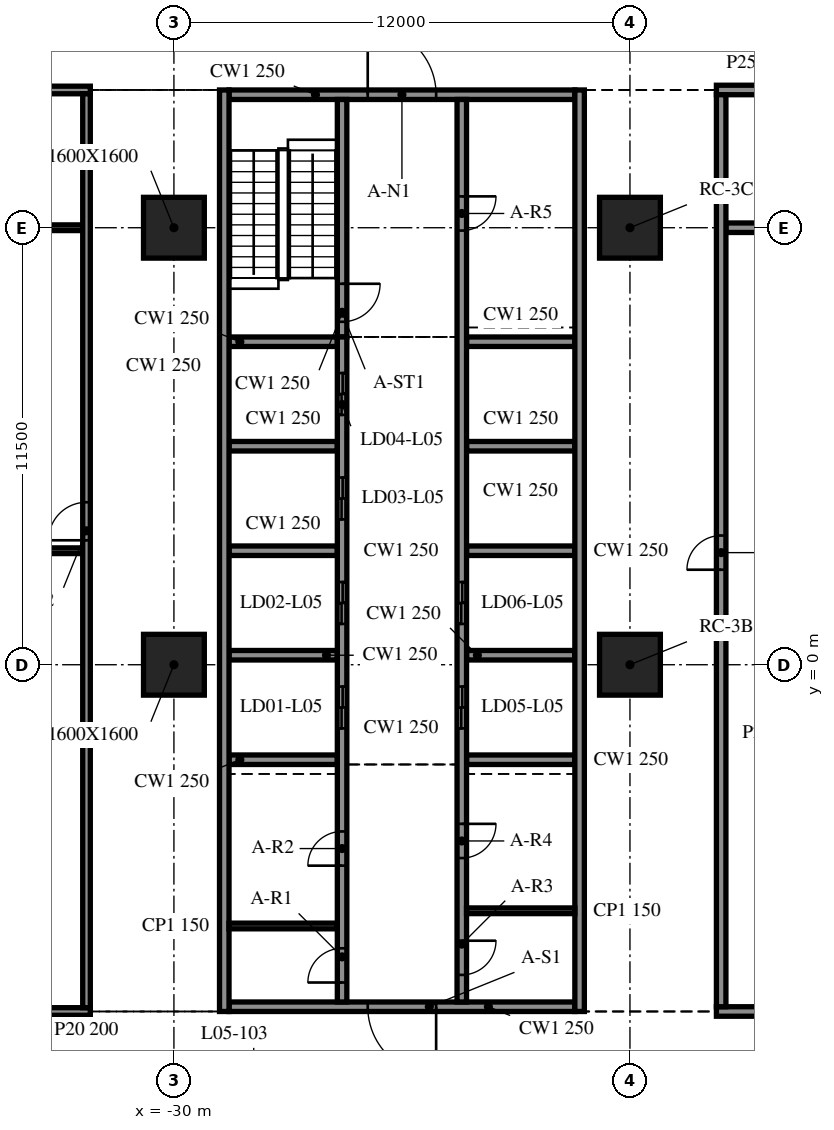
"""IFC4 building model, lengths in metres.
Left out: names, types, materials, properties, quantities, classifications, styles, units other than length and angle.
Written with IfcOpenShell. Run it as: python <this file> out.ifc"""

import sys

from ifc_helpers import new_model, si_unit, direction, frame, frame_2d, origin, origin_2d, place, context, subcontext, project, spatial, rectangle, extrude, element, fill, save


model = new_model("IFC4")
c1 = context("Model", 3, precision=1e-05, world=origin(), true_north=direction((0.0, 1.0)))
c2 = subcontext(c1, "Body", "Model", "MODEL_VIEW")
j1 = project(units=[si_unit("LENGTHUNIT", "METRE"), si_unit("PLANEANGLEUNIT", "RADIAN")], contexts=[c1])
p1 = place(None, origin())
s1 = spatial("IfcSite", under=j1, at=p1, CompositionType="ELEMENT")
p2 = place(p1, origin())
s2 = spatial("IfcBuilding", under=s1, at=p2, CompositionType="ELEMENT")
p3 = place(p2, frame((0.0, 0.0, 24.4)))
s3 = spatial("IfcBuildingStorey", under=s2, at=p3, CompositionType="ELEMENT", Elevation=24.4)
for number, where, z_axis, x_axis in (
    (1, (-30.0, 0.0, -0.34), (0.0, 0.0, 1.0), (1.0, 0.0, 0.0)),
    (2, (-30.0, 11.5, -0.34), (0.0, 0.0, 1.0), (1.0, 0.0, 0.0)),
    (3, (-18.0, 0.0, -0.34), (0.0, 0.0, 1.0), (1.0, 0.0, 0.0)),
    (4, (-18.0, 11.5, -0.34), (0.0, 0.0, 1.0), (1.0, 0.0, 0.0)),
):
    element("IfcColumn", number, at=place(p3, frame(where, z_axis=z_axis, x_axis=x_axis)), inside=s3, PredefinedType="COLUMN", context=c2, shape_type="SweptSolid", body=[
        extrude(rectangle(XDim=1.6, YDim=1.6, at=origin_2d()), origin(), (0.0, 0.0, 1.0), 4.3),
    ])
for number, where, z_axis, x_axis in (
    (5, (-28.675, 15.125, 0.0), (0.0, 0.0, 1.0), (0.0, -1.0, 0.0)),
    (6, (-19.325, -9.125, 0.0), (0.0, 0.0, 1.0), (0.0, 1.0, 0.0)),
):
    element("IfcWall", number, at=place(p3, frame(where, z_axis=z_axis, x_axis=x_axis)), inside=s3, PredefinedType="SOLIDWALL", context=c2, shape_type="SweptSolid", body=[
        extrude(rectangle(XDim=24.25, YDim=0.25, at=frame_2d((12.125, 0.0))), origin(), (0.0, 0.0, 1.0), 3.96),
    ])
p4 = place(p3, frame((-19.45, -9.0, 0.0), z_axis=(0.0, 0.0, 1.0), x_axis=(-1.0, 0.0, 0.0)))
e7 = element("IfcWall", 7, at=p4, inside=s3, PredefinedType="SOLIDWALL", context=c2, shape_type="SweptSolid", body=[
    extrude(rectangle(XDim=9.1, YDim=0.25, at=frame_2d((4.55, 0.0))), origin(), (0.0, 0.0, 1.0), 3.96),
])
p5 = place(p4, frame((3.65, 0.0, 0.0)))
e8 = element("IfcOpeningElement", 8, at=p5, cuts=e7, PredefinedType="OPENING", context=c2, shape_type="SweptSolid", body=[
    extrude(rectangle(XDim=1.8, YDim=2.1, at=frame_2d((0.9, 1.05))), frame((0.0, 0.135, 0.0), z_axis=(0.0, -1.0, 0.0), x_axis=(1.0, 0.0, 0.0)), (0.0, 0.0, 1.0), 0.27),
])
p6 = place(p3, frame((-28.55, 15.0, 0.0), z_axis=(0.0, 0.0, 1.0), x_axis=(1.0, 0.0, 0.0)))
e9 = element("IfcWall", 9, at=p6, inside=s3, PredefinedType="SOLIDWALL", context=c2, shape_type="SweptSolid", body=[
    extrude(rectangle(XDim=9.1, YDim=0.25, at=frame_2d((4.55, 0.0))), origin(), (0.0, 0.0, 1.0), 3.96),
])
p7 = place(p6, frame((3.65, 0.0, 0.0)))
e10 = element("IfcOpeningElement", 10, at=p7, cuts=e9, PredefinedType="OPENING", context=c2, shape_type="SweptSolid", body=[
    extrude(rectangle(XDim=1.8, YDim=2.1, at=frame_2d((0.9, 1.05))), frame((0.0, 0.135, 0.0), z_axis=(0.0, -1.0, 0.0), x_axis=(1.0, 0.0, 0.0)), (0.0, 0.0, 1.0), 0.27),
])
p8 = place(p3, frame((-25.575, -8.875, 0.0), z_axis=(0.0, 0.0, 1.0), x_axis=(0.0, 1.0, 0.0)))
e11 = element("IfcWall", 11, at=p8, inside=s3, PredefinedType="SOLIDWALL", context=c2, shape_type="SweptSolid", body=[
    extrude(rectangle(XDim=17.5, YDim=0.25, at=frame_2d((8.75, 0.0))), origin(), (0.0, 0.0, 1.0), 3.96),
])
p9 = place(p8, frame((7.2, 0.0, 0.0)))
e12 = element("IfcOpeningElement", 12, at=p9, cuts=e11, PredefinedType="OPENING", context=c2, shape_type="SweptSolid", body=[
    extrude(rectangle(XDim=1.1, YDim=2.1, at=frame_2d((0.55, 1.05))), frame((0.0, 0.135, 0.0), z_axis=(0.0, -1.0, 0.0), x_axis=(1.0, 0.0, 0.0)), (0.0, 0.0, 1.0), 0.27),
])
p10 = place(p8, frame((9.95, 0.0, 0.0)))
e13 = element("IfcOpeningElement", 13, at=p10, cuts=e11, PredefinedType="OPENING", context=c2, shape_type="SweptSolid", body=[
    extrude(rectangle(XDim=1.1, YDim=2.1, at=frame_2d((0.55, 1.05))), frame((0.0, 0.135, 0.0), z_axis=(0.0, -1.0, 0.0), x_axis=(1.0, 0.0, 0.0)), (0.0, 0.0, 1.0), 0.27),
])
p11 = place(p8, frame((12.7, 0.0, 0.0)))
e14 = element("IfcOpeningElement", 14, at=p11, cuts=e11, PredefinedType="OPENING", context=c2, shape_type="SweptSolid", body=[
    extrude(rectangle(XDim=1.1, YDim=2.1, at=frame_2d((0.55, 1.05))), frame((0.0, 0.135, 0.0), z_axis=(0.0, -1.0, 0.0), x_axis=(1.0, 0.0, 0.0)), (0.0, 0.0, 1.0), 0.27),
])
p12 = place(p8, frame((15.45, 0.0, 0.0)))
e15 = element("IfcOpeningElement", 15, at=p12, cuts=e11, PredefinedType="OPENING", context=c2, shape_type="SweptSolid", body=[
    extrude(rectangle(XDim=1.1, YDim=2.1, at=frame_2d((0.55, 1.05))), frame((0.0, 0.135, 0.0), z_axis=(0.0, -1.0, 0.0), x_axis=(1.0, 0.0, 0.0)), (0.0, 0.0, 1.0), 0.27),
])
p13 = place(p8, frame((0.512, 0.0, 0.0)))
e16 = element("IfcOpeningElement", 16, at=p13, cuts=e11, PredefinedType="OPENING", context=c2, shape_type="SweptSolid", body=[
    extrude(rectangle(XDim=0.9, YDim=2.1, at=frame_2d((0.45, 1.05))), frame((0.0, 0.135, 0.0), z_axis=(0.0, -1.0, 0.0), x_axis=(1.0, 0.0, 0.0)), (0.0, 0.0, 1.0), 0.27),
])
p14 = place(p8, frame((3.587, 0.0, 0.0)))
e17 = element("IfcOpeningElement", 17, at=p14, cuts=e11, PredefinedType="OPENING", context=c2, shape_type="SweptSolid", body=[
    extrude(rectangle(XDim=0.9, YDim=2.1, at=frame_2d((0.45, 1.05))), frame((0.0, 0.135, 0.0), z_axis=(0.0, -1.0, 0.0), x_axis=(1.0, 0.0, 0.0)), (0.0, 0.0, 1.0), 0.27),
])
p15 = place(p3, frame((-25.575, 14.875, 0.0), z_axis=(0.0, 0.0, 1.0), x_axis=(0.0, -1.0, 0.0)))
e18 = element("IfcWall", 18, at=p15, inside=s3, PredefinedType="SOLIDWALL", context=c2, shape_type="SweptSolid", body=[
    extrude(rectangle(XDim=6.25, YDim=0.25, at=frame_2d((3.125, 0.0))), origin(), (0.0, 0.0, 1.0), 3.96),
])
p16 = place(p15, frame((4.85, 0.0, 0.0)))
e19 = element("IfcOpeningElement", 19, at=p16, cuts=e18, PredefinedType="OPENING", context=c2, shape_type="SweptSolid", body=[
    extrude(rectangle(XDim=1.0, YDim=2.1, at=frame_2d((0.5, 1.05))), frame((0.0, 0.135, 0.0), z_axis=(0.0, -1.0, 0.0), x_axis=(1.0, 0.0, 0.0)), (0.0, 0.0, 1.0), 0.27),
])
p17 = place(p3, frame((-22.425, 14.875, 0.0), z_axis=(0.0, 0.0, 1.0), x_axis=(0.0, -1.0, 0.0)))
e20 = element("IfcWall", 20, at=p17, inside=s3, PredefinedType="SOLIDWALL", context=c2, shape_type="SweptSolid", body=[
    extrude(rectangle(XDim=23.75, YDim=0.25, at=frame_2d((11.875, 0.0))), origin(), (0.0, 0.0, 1.0), 3.96),
])
p18 = place(p17, frame((15.45, 0.0, 0.0)))
e21 = element("IfcOpeningElement", 21, at=p18, cuts=e20, PredefinedType="OPENING", context=c2, shape_type="SweptSolid", body=[
    extrude(rectangle(XDim=1.1, YDim=2.1, at=frame_2d((0.55, 1.05))), frame((0.0, 0.135, 0.0), z_axis=(0.0, -1.0, 0.0), x_axis=(1.0, 0.0, 0.0)), (0.0, 0.0, 1.0), 0.27),
])
p19 = place(p17, frame((12.7, 0.0, 0.0)))
e22 = element("IfcOpeningElement", 22, at=p19, cuts=e20, PredefinedType="OPENING", context=c2, shape_type="SweptSolid", body=[
    extrude(rectangle(XDim=1.1, YDim=2.1, at=frame_2d((0.55, 1.05))), frame((0.0, 0.135, 0.0), z_axis=(0.0, -1.0, 0.0), x_axis=(1.0, 0.0, 0.0)), (0.0, 0.0, 1.0), 0.27),
])
p20 = place(p17, frame((22.137, 0.0, 0.0)))
e23 = element("IfcOpeningElement", 23, at=p20, cuts=e20, PredefinedType="OPENING", context=c2, shape_type="SweptSolid", body=[
    extrude(rectangle(XDim=0.9, YDim=2.1, at=frame_2d((0.45, 1.05))), frame((0.0, 0.135, 0.0), z_axis=(0.0, -1.0, 0.0), x_axis=(1.0, 0.0, 0.0)), (0.0, 0.0, 1.0), 0.27),
])
p21 = place(p17, frame((19.062, 0.0, 0.0)))
e24 = element("IfcOpeningElement", 24, at=p21, cuts=e20, PredefinedType="OPENING", context=c2, shape_type="SweptSolid", body=[
    extrude(rectangle(XDim=0.9, YDim=2.1, at=frame_2d((0.45, 1.05))), frame((0.0, 0.135, 0.0), z_axis=(0.0, -1.0, 0.0), x_axis=(1.0, 0.0, 0.0)), (0.0, 0.0, 1.0), 0.27),
])
p22 = place(p17, frame((2.55, 0.0, 0.0)))
e25 = element("IfcOpeningElement", 25, at=p22, cuts=e20, PredefinedType="OPENING", context=c2, shape_type="SweptSolid", body=[
    extrude(rectangle(XDim=0.9, YDim=2.1, at=frame_2d((0.45, 1.05))), frame((0.0, 0.135, 0.0), z_axis=(0.0, -1.0, 0.0), x_axis=(1.0, 0.0, 0.0)), (0.0, 0.0, 1.0), 0.27),
])
for number, where, z_axis, x_axis in (
    (26, (-28.55, -2.5, 0.0), (0.0, 0.0, 1.0), (1.0, 0.0, 0.0)),
    (27, (-28.55, 0.25, 0.0), (0.0, 0.0, 1.0), (1.0, 0.0, 0.0)),
    (28, (-28.55, 3.0, 0.0), (0.0, 0.0, 1.0), (1.0, 0.0, 0.0)),
    (29, (-28.55, 5.75, 0.0), (0.0, 0.0, 1.0), (1.0, 0.0, 0.0)),
    (30, (-28.55, 8.5, 0.0), (0.0, 0.0, 1.0), (1.0, 0.0, 0.0)),
    (31, (-22.3, -2.5, 0.0), (0.0, 0.0, 1.0), (1.0, 0.0, 0.0)),
    (32, (-22.3, 0.25, 0.0), (0.0, 0.0, 1.0), (1.0, 0.0, 0.0)),
    (33, (-22.3, 3.0, 0.0), (0.0, 0.0, 1.0), (1.0, 0.0, 0.0)),
    (34, (-22.3, 5.75, 0.0), (0.0, 0.0, 1.0), (1.0, 0.0, 0.0)),
    (35, (-22.3, 8.5, 0.0), (0.0, 0.0, 1.0), (1.0, 0.0, 0.0)),
):
    element("IfcWall", number, at=place(p3, frame(where, z_axis=z_axis, x_axis=x_axis)), inside=s3, PredefinedType="SOLIDWALL", context=c2, shape_type="SweptSolid", body=[
        extrude(rectangle(XDim=2.85, YDim=0.25, at=frame_2d((1.425, 0.0))), origin(), (0.0, 0.0, 1.0), 3.96),
    ])
for number, where, z_axis, x_axis in (
    (36, (-28.55, -6.875, 0.0), (0.0, 0.0, 1.0), (1.0, 0.0, 0.0)),
    (37, (-22.3, -6.475, 0.0), (0.0, 0.0, 1.0), (1.0, 0.0, 0.0)),
):
    element("IfcWall", number, at=place(p3, frame(where, z_axis=z_axis, x_axis=x_axis)), inside=s3, PredefinedType="PARTITIONING", context=c2, shape_type="SweptSolid", body=[
        extrude(rectangle(XDim=2.85, YDim=0.15, at=frame_2d((1.425, 0.0))), origin(), (0.0, 0.0, 1.0), 3.96),
    ])
p23 = place(p3, frame((-45.55, -9.125, 0.0), z_axis=(0.0, 0.0, 1.0), x_axis=(1.0, 0.0, 0.0)))
e38 = element("IfcWall", 38, at=p23, inside=s3, PredefinedType="PARTITIONING", context=c2, shape_type="SweptSolid", body=[
    extrude(rectangle(XDim=13.35, YDim=0.2, at=frame_2d((6.675, 0.0))), origin(), (0.0, 0.0, 1.0), 3.96),
])
p24 = place(p23, frame((6.9, 0.0, 0.0)))
e39 = element("IfcOpeningElement", 39, at=p24, cuts=e38, PredefinedType="OPENING", context=c2, shape_type="SweptSolid", body=[
    extrude(rectangle(XDim=1.2, YDim=2.1, at=frame_2d((0.6, 1.05))), frame((0.0, 0.11, 0.0), z_axis=(0.0, -1.0, 0.0), x_axis=(1.0, 0.0, 0.0)), (0.0, 0.0, 1.0), 0.22),
])
p25 = place(p3, frame((-15.725, -9.125, 0.0), z_axis=(0.0, 0.0, 1.0), x_axis=(1.0, 0.0, 0.0)))
e40 = element("IfcWall", 40, at=p25, inside=s3, PredefinedType="PARTITIONING", context=c2, shape_type="SweptSolid", body=[
    extrude(rectangle(XDim=7.35, YDim=0.25, at=frame_2d((3.675, 0.0))), origin(), (0.0, 0.0, 1.0), 3.96),
])
p26 = place(p3, frame((-45.35, 3.0, 0.0), z_axis=(0.0, 0.0, 1.0), x_axis=(1.0, 0.0, 0.0)))
e41 = element("IfcWall", 41, at=p26, inside=s3, PredefinedType="PARTITIONING", context=c2, shape_type="SweptSolid", body=[
    extrude(rectangle(XDim=12.95, YDim=0.15, at=frame_2d((6.475, 0.0))), origin(), (0.0, 0.0, 1.0), 3.96),
])
p27 = place(p3, frame((-41.2, 11.5, 0.0), z_axis=(0.0, 0.0, 1.0), x_axis=(1.0, 0.0, 0.0)))
e42 = element("IfcWall", 42, at=p27, inside=s3, PredefinedType="PARTITIONING", context=c2, shape_type="SweptSolid", body=[
    extrude(rectangle(XDim=8.8, YDim=0.15, at=frame_2d((4.4, 0.0))), origin(), (0.0, 0.0, 1.0), 3.96),
])
p28 = place(p3, frame((-15.475, 11.5, 0.0), z_axis=(0.0, 0.0, 1.0), x_axis=(1.0, 0.0, 0.0)))
e43 = element("IfcWall", 43, at=p28, inside=s3, PredefinedType="PARTITIONING", context=c2, shape_type="SweptSolid", body=[
    extrude(rectangle(XDim=6.85, YDim=0.25, at=frame_2d((3.425, 0.0))), origin(), (0.0, 0.0, 1.0), 3.96),
])
p29 = place(p3, frame((-45.55, 15.125, 0.0), z_axis=(0.0, 0.0, 1.0), x_axis=(1.0, 0.0, 0.0)))
e44 = element("IfcWall", 44, at=p29, inside=s3, PredefinedType="PARTITIONING", context=c2, shape_type="SweptSolid", body=[
    extrude(rectangle(XDim=13.35, YDim=0.2, at=frame_2d((6.675, 0.0))), origin(), (0.0, 0.0, 1.0), 3.96),
])
p30 = place(p29, frame((5.3, 0.0, 0.0)))
e45 = element("IfcOpeningElement", 45, at=p30, cuts=e44, PredefinedType="OPENING", context=c2, shape_type="SweptSolid", body=[
    extrude(rectangle(XDim=1.0, YDim=2.1, at=frame_2d((0.5, 1.05))), frame((0.0, 0.11, 0.0), z_axis=(0.0, -1.0, 0.0), x_axis=(1.0, 0.0, 0.0)), (0.0, 0.0, 1.0), 0.22),
])
p31 = place(p29, frame((6.9, 0.0, 0.0)))
e46 = element("IfcOpeningElement", 46, at=p31, cuts=e44, PredefinedType="OPENING", context=c2, shape_type="SweptSolid", body=[
    extrude(rectangle(XDim=1.0, YDim=2.1, at=frame_2d((0.5, 1.05))), frame((0.0, 0.11, 0.0), z_axis=(0.0, -1.0, 0.0), x_axis=(1.0, 0.0, 0.0)), (0.0, 0.0, 1.0), 0.22),
])
p32 = place(p3, frame((-15.725, 15.125, 0.0), z_axis=(0.0, 0.0, 1.0), x_axis=(1.0, 0.0, 0.0)))
e47 = element("IfcWall", 47, at=p32, inside=s3, PredefinedType="PARTITIONING", context=c2, shape_type="SweptSolid", body=[
    extrude(rectangle(XDim=7.35, YDim=0.25, at=frame_2d((3.675, 0.0))), origin(), (0.0, 0.0, 1.0), 3.96),
])
p33 = place(p32, frame((3.3, 0.0, 0.0)))
e48 = element("IfcOpeningElement", 48, at=p33, cuts=e47, PredefinedType="OPENING", context=c2, shape_type="SweptSolid", body=[
    extrude(rectangle(XDim=0.9, YDim=2.1, at=frame_2d((0.45, 1.05))), frame((0.0, 0.135, 0.0), z_axis=(0.0, -1.0, 0.0), x_axis=(1.0, 0.0, 0.0)), (0.0, 0.0, 1.0), 0.27),
])
p34 = place(p3, frame((-32.3, -9.025, 0.0), z_axis=(0.0, 0.0, 1.0), x_axis=(0.0, 1.0, 0.0)))
e49 = element("IfcWall", 49, at=p34, inside=s3, PredefinedType="PARTITIONING", context=c2, shape_type="SweptSolid", body=[
    extrude(rectangle(XDim=24.05, YDim=0.2, at=frame_2d((12.025, 0.0))), origin(), (0.0, 0.0, 1.0), 3.96),
])
p35 = place(p34, frame((12.3, 0.0, 0.0)))
e50 = element("IfcOpeningElement", 50, at=p35, cuts=e49, PredefinedType="OPENING", context=c2, shape_type="SweptSolid", body=[
    extrude(rectangle(XDim=1.0, YDim=2.1, at=frame_2d((0.5, 1.05))), frame((0.0, 0.11, 0.0), z_axis=(0.0, -1.0, 0.0), x_axis=(1.0, 0.0, 0.0)), (0.0, 0.0, 1.0), 0.22),
])
p36 = place(p3, frame((-15.6, -9.0, 0.0), z_axis=(0.0, 0.0, 1.0), x_axis=(0.0, 1.0, 0.0)))
e51 = element("IfcWall", 51, at=p36, inside=s3, PredefinedType="PARTITIONING", context=c2, shape_type="SweptSolid", body=[
    extrude(rectangle(XDim=24.0, YDim=0.25, at=frame_2d((12.0, 0.0))), origin(), (0.0, 0.0, 1.0), 3.96),
])
p37 = place(p36, frame((11.5, 0.0, 0.0)))
e52 = element("IfcOpeningElement", 52, at=p37, cuts=e51, PredefinedType="OPENING", context=c2, shape_type="SweptSolid", body=[
    extrude(rectangle(XDim=0.9, YDim=2.1, at=frame_2d((0.45, 1.05))), frame((0.0, 0.135, 0.0), z_axis=(0.0, -1.0, 0.0), x_axis=(1.0, 0.0, 0.0)), (0.0, 0.0, 1.0), 0.27),
])
p38 = place(p5, origin())
e53 = element("IfcDoor", 53, at=p38, inside=s3, OperationType="DOUBLE_DOOR_SINGLE_SWING", PredefinedType="DOOR", context=c2, shape_type="SweptSolid", body=[
    extrude(rectangle(XDim=1.8, YDim=2.1, at=frame_2d((0.9, 1.05))), frame((0.0, 0.025, 0.0), z_axis=(0.0, -1.0, 0.0), x_axis=(1.0, 0.0, 0.0)), (0.0, 0.0, 1.0), 0.05),
])
fill(e8, e53)
p39 = place(p7, origin())
e54 = element("IfcDoor", 54, at=p39, inside=s3, OperationType="DOUBLE_DOOR_SINGLE_SWING", PredefinedType="DOOR", context=c2, shape_type="SweptSolid", body=[
    extrude(rectangle(XDim=1.8, YDim=2.1, at=frame_2d((0.9, 1.05))), frame((0.0, 0.025, 0.0), z_axis=(0.0, -1.0, 0.0), x_axis=(1.0, 0.0, 0.0)), (0.0, 0.0, 1.0), 0.05),
])
fill(e10, e54)
p40 = place(p18, origin())
e55 = element("IfcDoor", 55, at=p40, inside=s3, OperationType="DOUBLE_DOOR_SLIDING", PredefinedType="DOOR", context=c2, shape_type="SweptSolid", body=[
    extrude(rectangle(XDim=1.1, YDim=2.1, at=frame_2d((0.55, 1.05))), frame((0.0, 0.025, 0.0), z_axis=(0.0, -1.0, 0.0), x_axis=(1.0, 0.0, 0.0)), (0.0, 0.0, 1.0), 0.05),
])
fill(e21, e55)
p41 = place(p19, origin())
e56 = element("IfcDoor", 56, at=p41, inside=s3, OperationType="DOUBLE_DOOR_SLIDING", PredefinedType="DOOR", context=c2, shape_type="SweptSolid", body=[
    extrude(rectangle(XDim=1.1, YDim=2.1, at=frame_2d((0.55, 1.05))), frame((0.0, 0.025, 0.0), z_axis=(0.0, -1.0, 0.0), x_axis=(1.0, 0.0, 0.0)), (0.0, 0.0, 1.0), 0.05),
])
fill(e22, e56)
p42 = place(p9, origin())
e57 = element("IfcDoor", 57, at=p42, inside=s3, OperationType="DOUBLE_DOOR_SLIDING", PredefinedType="DOOR", context=c2, shape_type="SweptSolid", body=[
    extrude(rectangle(XDim=1.1, YDim=2.1, at=frame_2d((0.55, 1.05))), frame((0.0, 0.025, 0.0), z_axis=(0.0, -1.0, 0.0), x_axis=(1.0, 0.0, 0.0)), (0.0, 0.0, 1.0), 0.05),
])
fill(e12, e57)
p43 = place(p10, origin())
e58 = element("IfcDoor", 58, at=p43, inside=s3, OperationType="DOUBLE_DOOR_SLIDING", PredefinedType="DOOR", context=c2, shape_type="SweptSolid", body=[
    extrude(rectangle(XDim=1.1, YDim=2.1, at=frame_2d((0.55, 1.05))), frame((0.0, 0.025, 0.0), z_axis=(0.0, -1.0, 0.0), x_axis=(1.0, 0.0, 0.0)), (0.0, 0.0, 1.0), 0.05),
])
fill(e13, e58)
p44 = place(p11, origin())
e59 = element("IfcDoor", 59, at=p44, inside=s3, OperationType="DOUBLE_DOOR_SLIDING", PredefinedType="DOOR", context=c2, shape_type="SweptSolid", body=[
    extrude(rectangle(XDim=1.1, YDim=2.1, at=frame_2d((0.55, 1.05))), frame((0.0, 0.025, 0.0), z_axis=(0.0, -1.0, 0.0), x_axis=(1.0, 0.0, 0.0)), (0.0, 0.0, 1.0), 0.05),
])
fill(e14, e59)
p45 = place(p12, origin())
e60 = element("IfcDoor", 60, at=p45, inside=s3, OperationType="DOUBLE_DOOR_SLIDING", PredefinedType="DOOR", context=c2, shape_type="SweptSolid", body=[
    extrude(rectangle(XDim=1.1, YDim=2.1, at=frame_2d((0.55, 1.05))), frame((0.0, 0.025, 0.0), z_axis=(0.0, -1.0, 0.0), x_axis=(1.0, 0.0, 0.0)), (0.0, 0.0, 1.0), 0.05),
])
fill(e15, e60)
p46 = place(p13, origin())
e61 = element("IfcDoor", 61, at=p46, inside=s3, OperationType="SINGLE_SWING_LEFT", PredefinedType="DOOR", context=c2, shape_type="SweptSolid", body=[
    extrude(rectangle(XDim=0.9, YDim=2.1, at=frame_2d((0.45, 1.05))), frame((0.0, 0.025, 0.0), z_axis=(0.0, -1.0, 0.0), x_axis=(1.0, 0.0, 0.0)), (0.0, 0.0, 1.0), 0.05),
])
fill(e16, e61)
p47 = place(p14, origin())
e62 = element("IfcDoor", 62, at=p47, inside=s3, OperationType="SINGLE_SWING_RIGHT", PredefinedType="DOOR", context=c2, shape_type="SweptSolid", body=[
    extrude(rectangle(XDim=0.9, YDim=2.1, at=frame_2d((0.45, 1.05))), frame((0.0, 0.025, 0.0), z_axis=(0.0, -1.0, 0.0), x_axis=(1.0, 0.0, 0.0)), (0.0, 0.0, 1.0), 0.05),
])
fill(e17, e62)
p48 = place(p20, origin())
e63 = element("IfcDoor", 63, at=p48, inside=s3, OperationType="SINGLE_SWING_LEFT", PredefinedType="DOOR", context=c2, shape_type="SweptSolid", body=[
    extrude(rectangle(XDim=0.9, YDim=2.1, at=frame_2d((0.45, 1.05))), frame((0.0, 0.025, 0.0), z_axis=(0.0, -1.0, 0.0), x_axis=(1.0, 0.0, 0.0)), (0.0, 0.0, 1.0), 0.05),
])
fill(e23, e63)
p49 = place(p21, origin())
e64 = element("IfcDoor", 64, at=p49, inside=s3, OperationType="SINGLE_SWING_RIGHT", PredefinedType="DOOR", context=c2, shape_type="SweptSolid", body=[
    extrude(rectangle(XDim=0.9, YDim=2.1, at=frame_2d((0.45, 1.05))), frame((0.0, 0.025, 0.0), z_axis=(0.0, -1.0, 0.0), x_axis=(1.0, 0.0, 0.0)), (0.0, 0.0, 1.0), 0.05),
])
fill(e24, e64)
p50 = place(p22, origin())
e65 = element("IfcDoor", 65, at=p50, inside=s3, OperationType="SINGLE_SWING_LEFT", PredefinedType="DOOR", context=c2, shape_type="SweptSolid", body=[
    extrude(rectangle(XDim=0.9, YDim=2.1, at=frame_2d((0.45, 1.05))), frame((0.0, 0.025, 0.0), z_axis=(0.0, -1.0, 0.0), x_axis=(1.0, 0.0, 0.0)), (0.0, 0.0, 1.0), 0.05),
])
fill(e25, e65)
p51 = place(p16, origin())
e66 = element("IfcDoor", 66, at=p51, inside=s3, OperationType="SINGLE_SWING_RIGHT", PredefinedType="DOOR", context=c2, shape_type="SweptSolid", body=[
    extrude(rectangle(XDim=1.0, YDim=2.1, at=frame_2d((0.5, 1.05))), frame((0.0, 0.025, 0.0), z_axis=(0.0, -1.0, 0.0), x_axis=(1.0, 0.0, 0.0)), (0.0, 0.0, 1.0), 0.05),
])
fill(e19, e66)
p52 = place(p37, origin())
e67 = element("IfcDoor", 67, at=p52, inside=s3, OperationType="SINGLE_SWING_RIGHT", PredefinedType="DOOR", context=c2, shape_type="SweptSolid", body=[
    extrude(rectangle(XDim=0.9, YDim=2.1, at=frame_2d((0.45, 1.05))), frame((0.0, 0.025, 0.0), z_axis=(0.0, -1.0, 0.0), x_axis=(1.0, 0.0, 0.0)), (0.0, 0.0, 1.0), 0.05),
])
fill(e52, e67)
p53 = place(p35, origin())
e68 = element("IfcDoor", 68, at=p53, inside=s3, OperationType="SINGLE_SWING_RIGHT", PredefinedType="DOOR", context=c2, shape_type="SweptSolid", body=[
    extrude(rectangle(XDim=1.0, YDim=2.1, at=frame_2d((0.5, 1.05))), frame((0.0, 0.025, 0.0), z_axis=(0.0, -1.0, 0.0), x_axis=(1.0, 0.0, 0.0)), (0.0, 0.0, 1.0), 0.05),
])
fill(e50, e68)
save(model, sys.argv[1])
